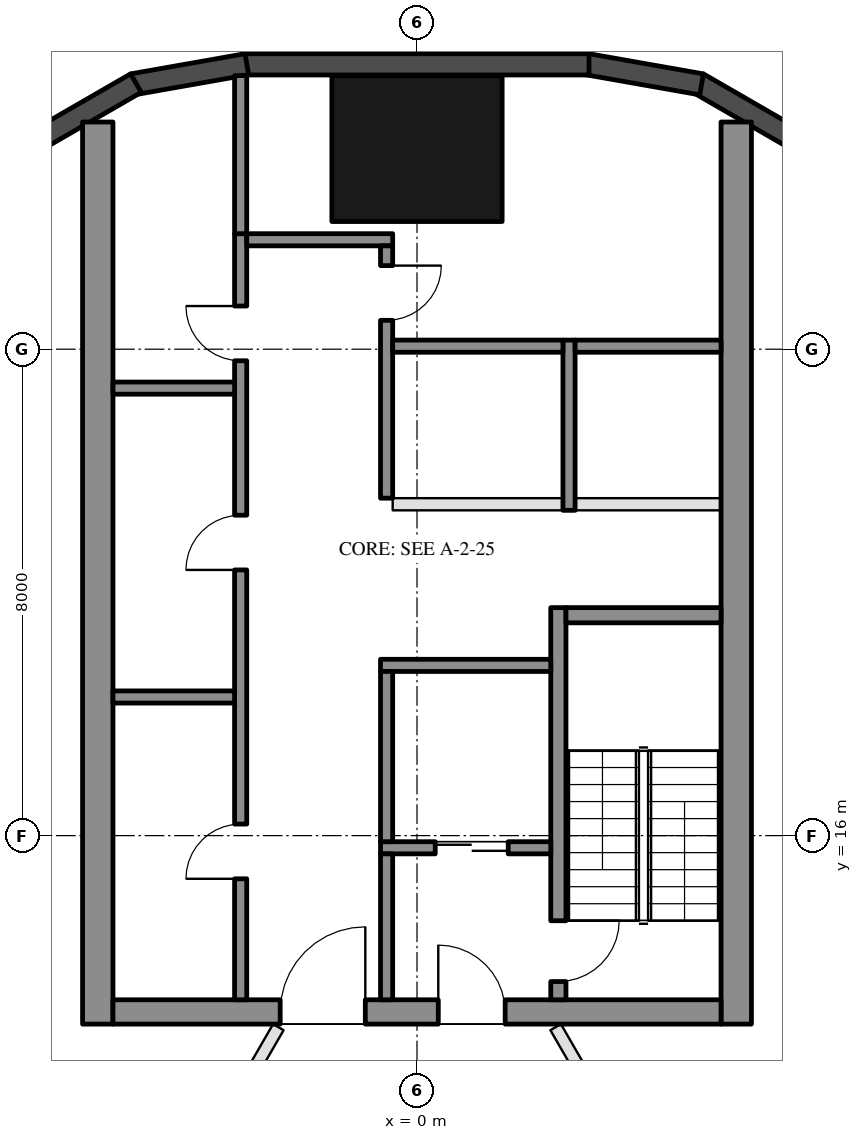
"""IFC4 building model, lengths in metres.
Left out: names, types, materials, properties, quantities, classifications, styles, units other than length and angle.
Written with IfcOpenShell. Run it as: python <this file> out.ifc"""

import sys

from ifc_helpers import new_model, si_unit, direction, frame, frame_2d, origin, origin_2d, place, context, subcontext, project, spatial, rectangle, hollow_rectangle, extrude, element, fill, save


model = new_model("IFC4")
c1 = context("Model", 3, precision=1e-05, world=origin(), true_north=direction((0.0, 1.0)))
c2 = subcontext(c1, "Body", "Model", "MODEL_VIEW")
j1 = project(units=[si_unit("LENGTHUNIT", "METRE"), si_unit("PLANEANGLEUNIT", "RADIAN")], contexts=[c1])
p1 = place(None, origin())
s1 = spatial("IfcSite", under=j1, at=p1, CompositionType="ELEMENT")
p2 = place(p1, origin())
s2 = spatial("IfcBuilding", under=s1, at=p2, CompositionType="ELEMENT")
p3 = place(p2, frame((0.0, 0.0, 113.1)))
s3 = spatial("IfcBuildingStorey", under=s2, at=p3, CompositionType="ELEMENT", Elevation=113.1)
p4 = place(p3, frame((0.0, 27.3, 0.0), z_axis=(0.0, 0.0, 1.0), x_axis=(1.0, 0.0, 0.0)))
e1 = element("IfcColumn", 1, at=p4, inside=s3, PredefinedType="COLUMN", context=c2, shape_type="SweptSolid", body=[
    extrude(hollow_rectangle(XDim=2.8, YDim=2.4, WallThickness=0.07, at=origin_2d()), origin(), (0.0, 0.0, 1.0), 3.7),
])
for number, where, z_axis, x_axis in (
    (2, (6.277, 27.422, 0.0), (0.0, 0.0, 1.0), (-0.866, 0.5, 0.0)),
    (3, (4.68, 28.356, 0.0), (0.0, 0.0, 1.0), (-0.985, 0.174, 0.0)),
):
    element("IfcWall", number, at=place(p3, frame(where, z_axis=z_axis, x_axis=x_axis)), inside=s3, PredefinedType="SOLIDWALL", context=c2, shape_type="SweptSolid", body=[
        extrude(rectangle(XDim=1.91, YDim=0.35, at=frame_2d((0.955, 0.0))), origin(), (0.0, 0.0, 1.0), 3.55),
    ])
p5 = place(p3, frame((2.829, 28.685, 0.0), z_axis=(0.0, 0.0, 1.0), x_axis=(-1.0, 0.0, 0.0)))
e4 = element("IfcWall", 4, at=p5, inside=s3, PredefinedType="SOLIDWALL", context=c2, shape_type="SweptSolid", body=[
    extrude(rectangle(XDim=5.658, YDim=0.35, at=frame_2d((2.829, 0.0))), origin(), (0.0, 0.0, 1.0), 3.55),
])
for number, where, z_axis, x_axis in (
    (5, (-2.799, 28.688, 0.0), (0.0, 0.0, 1.0), (-0.985, -0.174, 0.0)),
    (6, (-4.623, 28.377, 0.0), (0.0, 0.0, 1.0), (-0.866, -0.5, 0.0)),
):
    element("IfcWall", number, at=place(p3, frame(where, z_axis=z_axis, x_axis=x_axis)), inside=s3, PredefinedType="SOLIDWALL", context=c2, shape_type="SweptSolid", body=[
        extrude(rectangle(XDim=1.91, YDim=0.35, at=frame_2d((0.955, 0.0))), origin(), (0.0, 0.0, 1.0), 3.55),
    ])
for number, where, z_axis, x_axis in (
    (7, (5.25, 12.9, 0.0), (0.0, 0.0, 1.0), (0.0, 1.0, 0.0)),
    (8, (-5.25, 12.9, 0.0), (0.0, 0.0, 1.0), (0.0, 1.0, 0.0)),
):
    element("IfcWall", number, at=place(p3, frame(where, z_axis=z_axis, x_axis=x_axis)), inside=s3, PredefinedType="SHEAR", context=c2, shape_type="SweptSolid", body=[
        extrude(rectangle(XDim=14.837, YDim=0.5, at=frame_2d((7.418, 0.0))), origin(), (0.0, 0.0, 1.0), 3.5),
    ])
p6 = place(p3, frame((5.0, 13.1, 0.0), z_axis=(0.0, 0.0, 1.0), x_axis=(-1.0, 0.0, 0.0)))
e9 = element("IfcWall", 9, at=p6, inside=s3, PredefinedType="SHEAR", context=c2, shape_type="SweptSolid", body=[
    extrude(rectangle(XDim=10.0, YDim=0.4, at=frame_2d((5.0, 0.0))), origin(), (0.0, 0.0, 1.0), 3.5),
])
p7 = place(p6, frame((3.55, 0.0, 0.0)))
e10 = element("IfcOpeningElement", 10, at=p7, cuts=e9, PredefinedType="OPENING", context=c2, shape_type="SweptSolid", body=[
    extrude(rectangle(XDim=1.1, YDim=2.1, at=frame_2d((0.55, 1.05))), frame((0.0, 0.21, 0.0), z_axis=(0.0, -1.0, 0.0), x_axis=(1.0, 0.0, 0.0)), (0.0, 0.0, 1.0), 0.42),
])
p8 = place(p6, frame((5.85, 0.0, 0.0)))
e11 = element("IfcOpeningElement", 11, at=p8, cuts=e9, PredefinedType="OPENING", context=c2, shape_type="SweptSolid", body=[
    extrude(rectangle(XDim=1.4, YDim=2.1, at=frame_2d((0.7, 1.05))), frame((0.0, 0.21, 0.0), z_axis=(0.0, -1.0, 0.0), x_axis=(1.0, 0.0, 0.0)), (0.0, 0.0, 1.0), 0.42),
])
p9 = place(p3, frame((2.325, 13.3, 0.0), z_axis=(0.0, 0.0, 1.0), x_axis=(0.0, 1.0, 0.0)))
e12 = element("IfcWall", 12, at=p9, inside=s3, PredefinedType="SHEAR", context=c2, shape_type="SweptSolid", body=[
    extrude(rectangle(XDim=6.45, YDim=0.25, at=frame_2d((3.225, 0.0))), origin(), (0.0, 0.0, 1.0), 3.5),
])
p10 = place(p9, frame((0.3, 0.0, 0.0)))
e13 = element("IfcOpeningElement", 13, at=p10, cuts=e12, PredefinedType="OPENING", context=c2, shape_type="SweptSolid", body=[
    extrude(rectangle(XDim=1.0, YDim=2.1, at=frame_2d((0.5, 1.05))), frame((0.0, 0.135, 0.0), z_axis=(0.0, -1.0, 0.0), x_axis=(1.0, 0.0, 0.0)), (0.0, 0.0, 1.0), 0.27),
])
p11 = place(p3, frame((5.0, 19.625, 0.0), z_axis=(0.0, 0.0, 1.0), x_axis=(-1.0, 0.0, 0.0)))
e14 = element("IfcWall", 14, at=p11, inside=s3, PredefinedType="SHEAR", context=c2, shape_type="SweptSolid", body=[
    extrude(rectangle(XDim=2.55, YDim=0.25, at=frame_2d((1.275, 0.0))), origin(), (0.0, 0.0, 1.0), 3.5),
])
p12 = place(p3, frame((2.2, 18.8, 0.0), z_axis=(0.0, 0.0, 1.0), x_axis=(-1.0, 0.0, 0.0)))
e15 = element("IfcWall", 15, at=p12, inside=s3, PredefinedType="SHEAR", context=c2, shape_type="SweptSolid", body=[
    extrude(rectangle(XDim=2.8, YDim=0.2, at=frame_2d((1.4, 0.0))), origin(), (0.0, 0.0, 1.0), 3.5),
])
p13 = place(p3, frame((2.2, 15.8, 0.0), z_axis=(0.0, 0.0, 1.0), x_axis=(-1.0, 0.0, 0.0)))
e16 = element("IfcWall", 16, at=p13, inside=s3, PredefinedType="SHEAR", context=c2, shape_type="SweptSolid", body=[
    extrude(rectangle(XDim=2.8, YDim=0.2, at=frame_2d((1.4, 0.0))), origin(), (0.0, 0.0, 1.0), 3.5),
])
p14 = place(p13, frame((0.7, 0.0, 0.0)))
e17 = element("IfcOpeningElement", 17, at=p14, cuts=e16, PredefinedType="OPENING", context=c2, shape_type="SweptSolid", body=[
    extrude(rectangle(XDim=1.2, YDim=2.1, at=frame_2d((0.6, 1.05))), frame((0.0, 0.11, 0.0), z_axis=(0.0, -1.0, 0.0), x_axis=(1.0, 0.0, 0.0)), (0.0, 0.0, 1.0), 0.22),
])
p15 = place(p3, frame((-0.5, 15.9, 0.0), z_axis=(0.0, 0.0, 1.0), x_axis=(0.0, 1.0, 0.0)))
e18 = element("IfcWall", 18, at=p15, inside=s3, PredefinedType="SHEAR", context=c2, shape_type="SweptSolid", body=[
    extrude(rectangle(XDim=2.8, YDim=0.2, at=frame_2d((1.4, 0.0))), origin(), (0.0, 0.0, 1.0), 3.5),
])
p16 = place(p3, frame((-0.5, 13.3, 0.0), z_axis=(0.0, 0.0, 1.0), x_axis=(0.0, 1.0, 0.0)))
e19 = element("IfcWall", 19, at=p16, inside=s3, PredefinedType="SHEAR", context=c2, shape_type="SweptSolid", body=[
    extrude(rectangle(XDim=2.4, YDim=0.2, at=frame_2d((1.2, 0.0))), origin(), (0.0, 0.0, 1.0), 3.5),
])
p17 = place(p3, frame((-2.9, 13.3, 0.0), z_axis=(0.0, 0.0, 1.0), x_axis=(0.0, 1.0, 0.0)))
e20 = element("IfcWall", 20, at=p17, inside=s3, PredefinedType="SHEAR", context=c2, shape_type="SweptSolid", body=[
    extrude(rectangle(XDim=12.6, YDim=0.2, at=frame_2d((6.3, 0.0))), origin(), (0.0, 0.0, 1.0), 3.5),
])
p18 = place(p17, frame((1.99, 0.0, 0.0)))
e21 = element("IfcOpeningElement", 21, at=p18, cuts=e20, PredefinedType="OPENING", context=c2, shape_type="SweptSolid", body=[
    extrude(rectangle(XDim=0.9, YDim=2.1, at=frame_2d((0.45, 1.05))), frame((0.0, 0.11, 0.0), z_axis=(0.0, -1.0, 0.0), x_axis=(1.0, 0.0, 0.0)), (0.0, 0.0, 1.0), 0.22),
])
p19 = place(p17, frame((7.07, 0.0, 0.0)))
e22 = element("IfcOpeningElement", 22, at=p19, cuts=e20, PredefinedType="OPENING", context=c2, shape_type="SweptSolid", body=[
    extrude(rectangle(XDim=0.9, YDim=2.1, at=frame_2d((0.45, 1.05))), frame((0.0, 0.11, 0.0), z_axis=(0.0, -1.0, 0.0), x_axis=(1.0, 0.0, 0.0)), (0.0, 0.0, 1.0), 0.22),
])
p20 = place(p17, frame((10.51, 0.0, 0.0)))
e23 = element("IfcOpeningElement", 23, at=p20, cuts=e20, PredefinedType="OPENING", context=c2, shape_type="SweptSolid", body=[
    extrude(rectangle(XDim=0.9, YDim=2.1, at=frame_2d((0.45, 1.05))), frame((0.0, 0.11, 0.0), z_axis=(0.0, -1.0, 0.0), x_axis=(1.0, 0.0, 0.0)), (0.0, 0.0, 1.0), 0.22),
])
p21 = place(p3, frame((-0.4, 25.8, 0.0), z_axis=(0.0, 0.0, 1.0), x_axis=(-1.0, 0.0, 0.0)))
e24 = element("IfcWall", 24, at=p21, inside=s3, PredefinedType="SHEAR", context=c2, shape_type="SweptSolid", body=[
    extrude(rectangle(XDim=2.4, YDim=0.2, at=frame_2d((1.2, 0.0))), origin(), (0.0, 0.0, 1.0), 3.5),
])
p22 = place(p3, frame((-0.5, 21.55, 0.0), z_axis=(0.0, 0.0, 1.0), x_axis=(0.0, 1.0, 0.0)))
e25 = element("IfcWall", 25, at=p22, inside=s3, PredefinedType="SHEAR", context=c2, shape_type="SweptSolid", body=[
    extrude(rectangle(XDim=4.15, YDim=0.2, at=frame_2d((2.075, 0.0))), origin(), (0.0, 0.0, 1.0), 3.5),
])
p23 = place(p22, frame((2.925, 0.0, 0.0)))
e26 = element("IfcOpeningElement", 26, at=p23, cuts=e25, PredefinedType="OPENING", context=c2, shape_type="SweptSolid", body=[
    extrude(rectangle(XDim=0.9, YDim=2.1, at=frame_2d((0.45, 1.05))), frame((0.0, 0.11, 0.0), z_axis=(0.0, -1.0, 0.0), x_axis=(1.0, 0.0, 0.0)), (0.0, 0.0, 1.0), 0.22),
])
for number, where, z_axis, x_axis in (
    (27, (-3.0, 18.28, 0.0), (0.0, 0.0, 1.0), (-1.0, 0.0, 0.0)),
    (28, (-3.0, 23.36, 0.0), (0.0, 0.0, 1.0), (-1.0, 0.0, 0.0)),
):
    element("IfcWall", number, at=place(p3, frame(where, z_axis=z_axis, x_axis=x_axis)), inside=s3, PredefinedType="SHEAR", context=c2, shape_type="SweptSolid", body=[
        extrude(rectangle(XDim=2.0, YDim=0.2, at=frame_2d((1.0, 0.0))), origin(), (0.0, 0.0, 1.0), 3.5),
    ])
p24 = place(p3, frame((-2.9, 25.9, 0.0), z_axis=(0.0, 0.0, 1.0), x_axis=(0.0, 1.0, 0.0)))
e29 = element("IfcWall", 29, at=p24, inside=s3, PredefinedType="SHEAR", context=c2, shape_type="SweptSolid", body=[
    extrude(rectangle(XDim=2.6, YDim=0.2, at=frame_2d((1.3, 0.0))), origin(), (0.0, 0.0, 1.0), 3.5),
])
p25 = place(p3, frame((2.5, 21.35, 0.0), z_axis=(0.0, 0.0, 1.0), x_axis=(0.0, 1.0, 0.0)))
e30 = element("IfcWall", 30, at=p25, inside=s3, PredefinedType="SHEAR", context=c2, shape_type="SweptSolid", body=[
    extrude(rectangle(XDim=2.8, YDim=0.2, at=frame_2d((1.4, 0.0))), origin(), (0.0, 0.0, 1.0), 3.5),
])
p26 = place(p3, frame((5.0, 24.05, 0.0), z_axis=(0.0, 0.0, 1.0), x_axis=(-1.0, 0.0, 0.0)))
e31 = element("IfcWall", 31, at=p26, inside=s3, PredefinedType="SHEAR", context=c2, shape_type="SweptSolid", body=[
    extrude(rectangle(XDim=2.4, YDim=0.2, at=frame_2d((1.2, 0.0))), origin(), (0.0, 0.0, 1.0), 3.5),
])
p27 = place(p3, frame((2.4, 24.05, 0.0), z_axis=(0.0, 0.0, 1.0), x_axis=(-1.0, 0.0, 0.0)))
e32 = element("IfcWall", 32, at=p27, inside=s3, PredefinedType="SHEAR", context=c2, shape_type="SweptSolid", body=[
    extrude(rectangle(XDim=2.8, YDim=0.2, at=frame_2d((1.4, 0.0))), origin(), (0.0, 0.0, 1.0), 3.5),
])
p28 = place(p3, frame((5.0, 21.45, 0.0), z_axis=(0.0, 0.0, 1.0), x_axis=(-1.0, 0.0, 0.0)))
e33 = element("IfcWall", 33, at=p28, inside=s3, PredefinedType="PARTITIONING", context=c2, shape_type="SweptSolid", body=[
    extrude(rectangle(XDim=2.4, YDim=0.2, at=frame_2d((1.2, 0.0))), origin(), (0.0, 0.0, 1.0), 3.5),
])
p29 = place(p3, frame((2.4, 21.45, 0.0), z_axis=(0.0, 0.0, 1.0), x_axis=(-1.0, 0.0, 0.0)))
e34 = element("IfcWall", 34, at=p29, inside=s3, PredefinedType="PARTITIONING", context=c2, shape_type="SweptSolid", body=[
    extrude(rectangle(XDim=2.8, YDim=0.2, at=frame_2d((1.4, 0.0))), origin(), (0.0, 0.0, 1.0), 3.5),
])
p30 = place(p3, frame((15.097, 12.411, 0.0), z_axis=(0.0, 0.0, 1.0), x_axis=(-0.866027479907, -0.499996404033, 0.0)))
e35 = element("IfcWall", 35, at=p30, inside=s3, PredefinedType="PARTITIONING", context=c2, shape_type="SweptSolid", body=[
    extrude(rectangle(XDim=10.98, YDim=0.2, at=frame_2d((5.49, 0.0))), origin(), (0.0, 0.0, 1.0), 2.96),
])
p31 = place(p3, frame((2.281, 12.85, 0.0), z_axis=(0.0, 0.0, 1.0), x_axis=(0.499982611572, -0.866035442765, 0.0)))
e36 = element("IfcWall", 36, at=p31, inside=s3, PredefinedType="PARTITIONING", context=c2, shape_type="SweptSolid", body=[
    extrude(rectangle(XDim=6.688, YDim=0.2, at=frame_2d((3.344, 0.0))), origin(), (0.0, 0.0, 1.0), 2.95),
])
p32 = place(p31, frame((2.844, 0.0, 0.0)))
e37 = element("IfcOpeningElement", 37, at=p32, cuts=e36, PredefinedType="OPENING", context=c2, shape_type="SweptSolid", body=[
    extrude(rectangle(XDim=1.0, YDim=2.1, at=frame_2d((0.5, 1.05))), frame((0.0, 0.11, 0.0), z_axis=(0.0, -1.0, 0.0), x_axis=(1.0, 0.0, 0.0)), (0.0, 0.0, 1.0), 0.22),
])
p33 = place(p3, frame((-6.625, 5.326, 0.0), z_axis=(0.0, 0.0, 1.0), x_axis=(0.499980288617, 0.866036783858, 0.0)))
e38 = element("IfcWall", 38, at=p33, inside=s3, PredefinedType="PARTITIONING", context=c2, shape_type="SweptSolid", body=[
    extrude(rectangle(XDim=8.688, YDim=0.2, at=frame_2d((4.344, 0.0))), origin(), (0.0, 0.0, 1.0), 2.95),
])
p34 = place(p33, frame((3.844, 0.0, 0.0)))
e39 = element("IfcOpeningElement", 39, at=p34, cuts=e38, PredefinedType="OPENING", context=c2, shape_type="SweptSolid", body=[
    extrude(rectangle(XDim=1.0, YDim=2.1, at=frame_2d((0.5, 1.05))), frame((0.0, 0.11, 0.0), z_axis=(0.0, -1.0, 0.0), x_axis=(1.0, 0.0, 0.0)), (0.0, 0.0, 1.0), 0.22),
])
p35 = place(p14, origin())
e40 = element("IfcDoor", 40, at=p35, inside=s3, OperationType="DOUBLE_DOOR_SLIDING", PredefinedType="DOOR", context=c2, shape_type="SweptSolid", body=[
    extrude(rectangle(XDim=1.2, YDim=2.1, at=frame_2d((0.6, 1.05))), frame((0.0, 0.025, 0.0), z_axis=(0.0, -1.0, 0.0), x_axis=(1.0, 0.0, 0.0)), (0.0, 0.0, 1.0), 0.05),
])
fill(e17, e40)
p36 = place(p18, origin())
e41 = element("IfcDoor", 41, at=p36, inside=s3, OperationType="SINGLE_SWING_LEFT", PredefinedType="DOOR", context=c2, shape_type="SweptSolid", body=[
    extrude(rectangle(XDim=0.9, YDim=2.1, at=frame_2d((0.45, 1.05))), frame((0.0, 0.025, 0.0), z_axis=(0.0, -1.0, 0.0), x_axis=(1.0, 0.0, 0.0)), (0.0, 0.0, 1.0), 0.05),
])
fill(e21, e41)
p37 = place(p19, origin())
e42 = element("IfcDoor", 42, at=p37, inside=s3, OperationType="SINGLE_SWING_LEFT", PredefinedType="DOOR", context=c2, shape_type="SweptSolid", body=[
    extrude(rectangle(XDim=0.9, YDim=2.1, at=frame_2d((0.45, 1.05))), frame((0.0, 0.025, 0.0), z_axis=(0.0, -1.0, 0.0), x_axis=(1.0, 0.0, 0.0)), (0.0, 0.0, 1.0), 0.05),
])
fill(e22, e42)
p38 = place(p20, origin())
e43 = element("IfcDoor", 43, at=p38, inside=s3, OperationType="SINGLE_SWING_RIGHT", PredefinedType="DOOR", context=c2, shape_type="SweptSolid", body=[
    extrude(rectangle(XDim=0.9, YDim=2.1, at=frame_2d((0.45, 1.05))), frame((0.0, 0.025, 0.0), z_axis=(0.0, -1.0, 0.0), x_axis=(1.0, 0.0, 0.0)), (0.0, 0.0, 1.0), 0.05),
])
fill(e23, e43)
p39 = place(p23, frame((0.9, 0.0, 0.0), z_axis=(0.0, 0.0, 1.0), x_axis=(-1.0, 0.0, 0.0)))
e44 = element("IfcDoor", 44, at=p39, inside=s3, OperationType="SINGLE_SWING_LEFT", PredefinedType="DOOR", context=c2, shape_type="SweptSolid", body=[
    extrude(rectangle(XDim=0.9, YDim=2.1, at=frame_2d((0.45, 1.05))), frame((0.0, 0.025, 0.0), z_axis=(0.0, -1.0, 0.0), x_axis=(1.0, 0.0, 0.0)), (0.0, 0.0, 1.0), 0.05),
])
fill(e26, e44)
p40 = place(p7, frame((1.1, 0.0, 0.0), z_axis=(0.0, 0.0, 1.0), x_axis=(-1.0, 0.0, 0.0)))
e45 = element("IfcDoor", 45, at=p40, inside=s3, OperationType="SINGLE_SWING_LEFT", PredefinedType="DOOR", context=c2, shape_type="SweptSolid", body=[
    extrude(rectangle(XDim=1.1, YDim=2.1, at=frame_2d((0.55, 1.05))), frame((0.0, 0.025, 0.0), z_axis=(0.0, -1.0, 0.0), x_axis=(1.0, 0.0, 0.0)), (0.0, 0.0, 1.0), 0.05),
])
fill(e10, e45)
p41 = place(p8, frame((1.4, 0.0, 0.0), z_axis=(0.0, 0.0, 1.0), x_axis=(-1.0, 0.0, 0.0)))
e46 = element("IfcDoor", 46, at=p41, inside=s3, OperationType="DOUBLE_DOOR_SINGLE_SWING", PredefinedType="DOOR", context=c2, shape_type="SweptSolid", body=[
    extrude(rectangle(XDim=1.4, YDim=2.1, at=frame_2d((0.7, 1.05))), frame((0.0, 0.025, 0.0), z_axis=(0.0, -1.0, 0.0), x_axis=(1.0, 0.0, 0.0)), (0.0, 0.0, 1.0), 0.05),
])
fill(e11, e46)
p42 = place(p10, frame((1.0, 0.0, 0.0), z_axis=(0.0, 0.0, 1.0), x_axis=(-1.0, 0.0, 0.0)))
e47 = element("IfcDoor", 47, at=p42, inside=s3, OperationType="SINGLE_SWING_LEFT", PredefinedType="DOOR", context=c2, shape_type="SweptSolid", body=[
    extrude(rectangle(XDim=1.0, YDim=2.1, at=frame_2d((0.5, 1.05))), frame((0.0, 0.025, 0.0), z_axis=(0.0, -1.0, 0.0), x_axis=(1.0, 0.0, 0.0)), (0.0, 0.0, 1.0), 0.05),
])
fill(e13, e47)
save(model, sys.argv[1])
